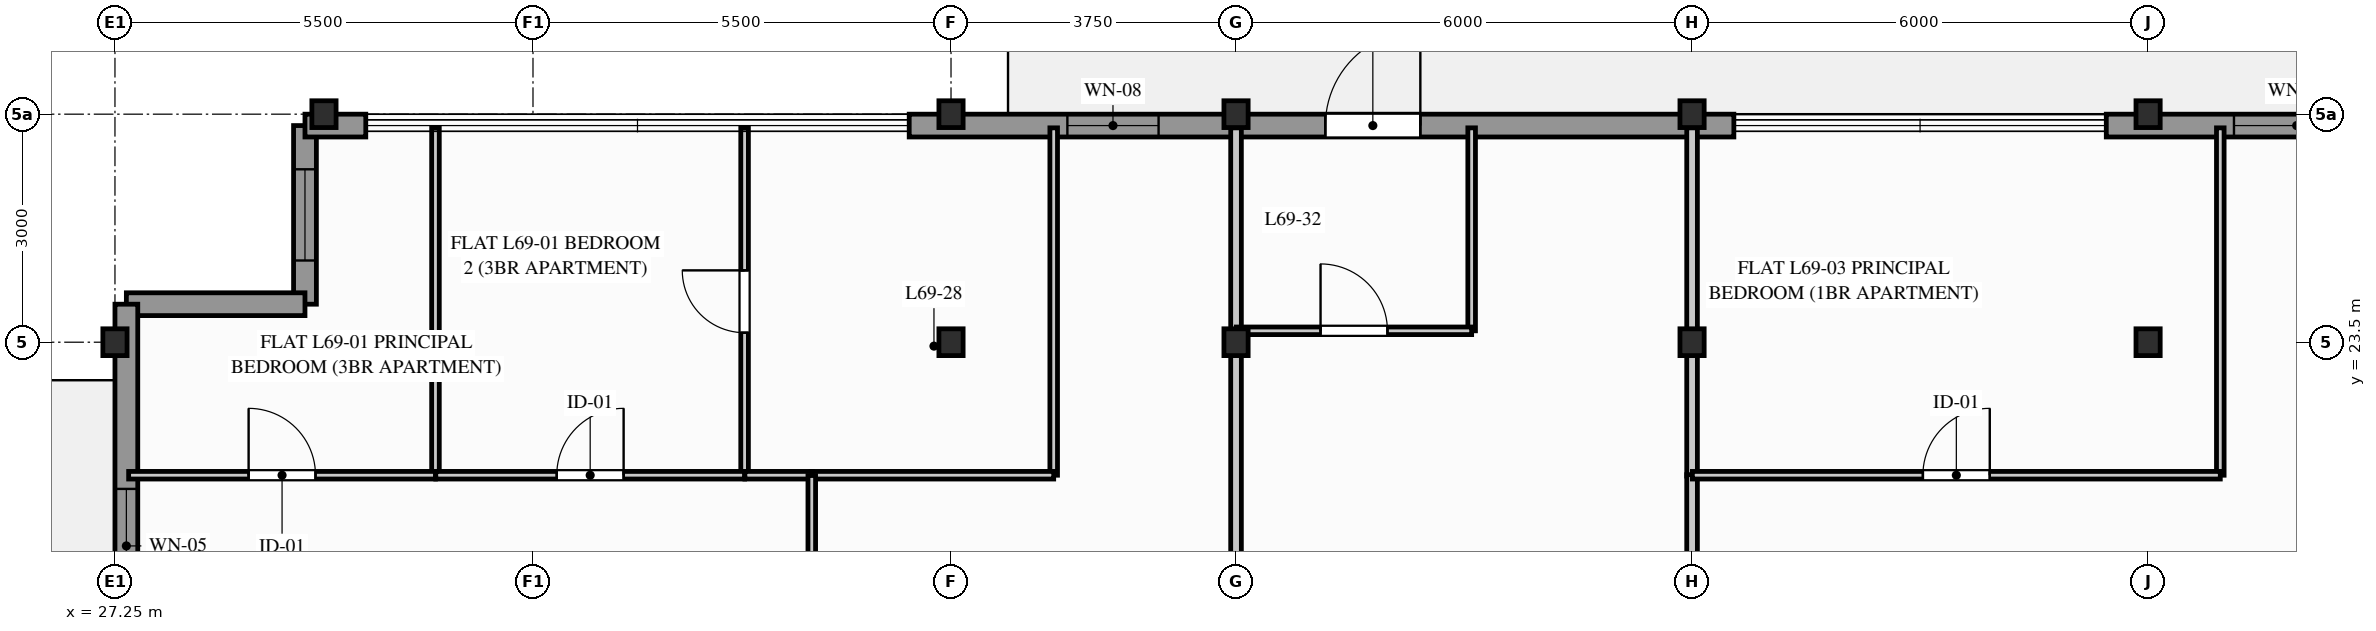
"""IFC4 building model, lengths in metres.
Left out: names, types, materials, properties, quantities, classifications, styles, units other than length and angle.
Written with IfcOpenShell. Run it as: python <this file> out.ifc"""

import sys

from ifc_helpers import new_model, si_unit, direction, frame, frame_2d, origin, origin_2d, place, context, subcontext, project, spatial, rectangle, i_section, extrude, element, fill, save


model = new_model("IFC4")
c1 = context("Model", 3, precision=1e-05, world=origin(), true_north=direction((0.0, 1.0)))
c2 = subcontext(c1, "Body", "Model", "MODEL_VIEW")
j1 = project(units=[si_unit("LENGTHUNIT", "METRE"), si_unit("PLANEANGLEUNIT", "RADIAN")], contexts=[c1])
p1 = place(None, origin())
s1 = spatial("IfcSite", under=j1, at=p1, CompositionType="ELEMENT")
p2 = place(p1, origin())
s2 = spatial("IfcBuilding", under=s1, at=p2, CompositionType="ELEMENT")
p3 = place(p2, frame((0.0, 0.0, 227.3)))
s3 = spatial("IfcBuildingStorey", under=s2, at=p3, CompositionType="ELEMENT", Elevation=227.3)
for number, where, z_axis, x_axis in (
    (1, (27.25, 23.5, 0.0), (0.0, 0.0, 1.0), (1.0, 0.0, 0.0)),
    (2, (30.0, 26.5, 0.0), (0.0, 0.0, 1.0), (1.0, 0.0, 0.0)),
    (3, (38.25, 23.5, 0.0), (0.0, 0.0, 1.0), (1.0, 0.0, 0.0)),
    (4, (38.25, 26.5, 0.0), (0.0, 0.0, 1.0), (1.0, 0.0, 0.0)),
    (5, (42.0, 23.5, 0.0), (0.0, 0.0, 1.0), (1.0, 0.0, 0.0)),
    (6, (42.0, 26.5, 0.0), (0.0, 0.0, 1.0), (1.0, 0.0, 0.0)),
    (7, (48.0, 23.5, 0.0), (0.0, 0.0, 1.0), (1.0, 0.0, 0.0)),
    (8, (48.0, 26.5, 0.0), (0.0, 0.0, 1.0), (1.0, 0.0, 0.0)),
    (9, (54.0, 23.5, 0.0), (0.0, 0.0, 1.0), (1.0, 0.0, 0.0)),
    (10, (54.0, 26.5, 0.0), (0.0, 0.0, 1.0), (1.0, 0.0, 0.0)),
):
    element("IfcColumn", number, at=place(p3, frame(where, z_axis=z_axis, x_axis=x_axis)), inside=s3, PredefinedType="COLUMN", context=c2, shape_type="SweptSolid", body=[
        extrude(i_section(OverallWidth=0.318, OverallDepth=0.353, WebThickness=0.023, FlangeThickness=0.038, FilletRadius=0.015, at=origin_2d()), origin(), (0.0, 0.0, 1.0), 3.1),
    ])
p4 = place(p3, frame((29.75, 26.35, 0.0), z_axis=(0.0, 0.0, 1.0), x_axis=(0.0, -1.0, 0.0)))
e11 = element("IfcWall", 11, at=p4, inside=s3, PredefinedType="STANDARD", context=c2, shape_type="SweptSolid", body=[
    extrude(rectangle(XDim=2.35, YDim=0.3, at=frame_2d((1.175, 0.0))), origin(), (0.0, 0.0, 1.0), 2.89),
])
p5 = place(p4, frame((0.575, 0.0, 0.95)))
e12 = element("IfcOpeningElement", 12, at=p5, cuts=e11, PredefinedType="OPENING", context=c2, shape_type="SweptSolid", body=[
    extrude(rectangle(XDim=1.2, YDim=1.6, at=frame_2d((0.6, 0.8))), frame((0.0, 0.16, 0.0), z_axis=(0.0, -1.0, 0.0), x_axis=(1.0, 0.0, 0.0)), (0.0, 0.0, 1.0), 0.32),
])
p6 = place(p3, frame((29.75, 24.0, 0.0), z_axis=(0.0, 0.0, 1.0), x_axis=(-1.0, 0.0, 0.0)))
e13 = element("IfcWall", 13, at=p6, inside=s3, PredefinedType="STANDARD", context=c2, shape_type="SweptSolid", body=[
    extrude(rectangle(XDim=2.35, YDim=0.3, at=frame_2d((1.175, 0.0))), origin(), (0.0, 0.0, 1.0), 2.89),
])
p7 = place(p3, frame((29.75, 26.35, 0.0), z_axis=(0.0, 0.0, 1.0), x_axis=(1.0, 0.0, 0.0)))
e14 = element("IfcWall", 14, at=p7, inside=s3, PredefinedType="STANDARD", context=c2, shape_type="SweptSolid", body=[
    extrude(rectangle(XDim=0.8, YDim=0.3, at=frame_2d((0.4, 0.0))), origin(), (0.0, 0.0, 1.0), 2.89),
])
p8 = place(p3, frame((37.7, 26.35, 0.0), z_axis=(0.0, 0.0, 1.0), x_axis=(1.0, 0.0, 0.0)))
e15 = element("IfcWall", 15, at=p8, inside=s3, PredefinedType="STANDARD", context=c2, shape_type="SweptSolid", body=[
    extrude(rectangle(XDim=10.85, YDim=0.3, at=frame_2d((5.425, 0.0))), origin(), (0.0, 0.0, 1.0), 2.332),
])
p9 = place(p8, frame((5.475, 0.0, 0.0)))
e16 = element("IfcOpeningElement", 16, at=p9, cuts=e15, PredefinedType="OPENING", context=c2, shape_type="SweptSolid", body=[
    extrude(rectangle(XDim=1.25, YDim=2.2, at=frame_2d((0.625, 1.1))), frame((0.0, 0.16, 0.0), z_axis=(0.0, -1.0, 0.0), x_axis=(1.0, 0.0, 0.0)), (0.0, 0.0, 1.0), 0.32),
])
p10 = place(p8, frame((2.081, 0.0, 0.512)))
e17 = element("IfcOpeningElement", 17, at=p10, cuts=e15, PredefinedType="OPENING", context=c2, shape_type="SweptSolid", body=[
    extrude(rectangle(XDim=1.2, YDim=1.6, at=frame_2d((0.6, 0.8))), frame((0.0, 0.16, 0.0), z_axis=(0.0, -1.0, 0.0), x_axis=(1.0, 0.0, 0.0)), (0.0, 0.0, 1.0), 0.32),
])
p11 = place(p3, frame((53.45, 26.35, 0.0), z_axis=(0.0, 0.0, 1.0), x_axis=(1.0, 0.0, 0.0)))
e18 = element("IfcWall", 18, at=p11, inside=s3, PredefinedType="STANDARD", context=c2, shape_type="SweptSolid", body=[
    extrude(rectangle(XDim=4.05, YDim=0.3, at=frame_2d((2.025, 0.0))), origin(), (0.0, 0.0, 1.0), 2.89),
])
p12 = place(p11, frame((1.68, 0.0, 0.77)))
e19 = element("IfcOpeningElement", 19, at=p12, cuts=e18, PredefinedType="OPENING", context=c2, shape_type="SweptSolid", body=[
    extrude(rectangle(XDim=1.65, YDim=1.9, at=frame_2d((0.825, 0.95))), frame((0.0, 0.16, 0.0), z_axis=(0.0, -1.0, 0.0), x_axis=(1.0, 0.0, 0.0)), (0.0, 0.0, 1.0), 0.32),
])
p13 = place(p3, frame((27.4, 24.0, 0.0), z_axis=(0.0, 0.0, 1.0), x_axis=(0.0, -1.0, 0.0)))
e20 = element("IfcWall", 20, at=p13, inside=s3, PredefinedType="STANDARD", context=c2, shape_type="SweptSolid", body=[
    extrude(rectangle(XDim=21.5, YDim=0.3, at=frame_2d((10.75, 0.0))), origin(), (0.0, 0.0, 1.0), 2.332),
])
p14 = place(p13, frame((5.5, 0.0, 0.0)))
e21 = element("IfcOpeningElement", 21, at=p14, cuts=e20, PredefinedType="OPENING", context=c2, shape_type="SweptSolid", body=[
    extrude(rectangle(XDim=1.1, YDim=2.2, at=frame_2d((0.55, 1.1))), frame((0.0, 0.16, 0.0), z_axis=(0.0, -1.0, 0.0), x_axis=(1.0, 0.0, 0.0)), (0.0, 0.0, 1.0), 0.32),
])
p15 = place(p13, frame((2.43, 0.0, 0.312)))
e22 = element("IfcOpeningElement", 22, at=p15, cuts=e20, PredefinedType="OPENING", context=c2, shape_type="SweptSolid", body=[
    extrude(rectangle(XDim=1.5, YDim=1.8, at=frame_2d((0.75, 0.9))), frame((0.0, 0.16, 0.0), z_axis=(0.0, -1.0, 0.0), x_axis=(1.0, 0.0, 0.0)), (0.0, 0.0, 1.0), 0.32),
])
p16 = place(p3, frame((31.467, 21.75, 0.0), z_axis=(0.0, 0.0, 1.0), x_axis=(0.0, 1.0, 0.0)))
e23 = element("IfcWall", 23, at=p16, inside=s3, PredefinedType="PARTITIONING", context=c2, shape_type="SweptSolid", body=[
    extrude(rectangle(XDim=4.57, YDim=0.1, at=frame_2d((2.285, 0.0))), origin(), (0.0, 0.0, 1.0), 2.325),
])
p17 = place(p3, frame((27.43, 21.75, 0.0), z_axis=(0.0, 0.0, 1.0), x_axis=(1.0, 0.0, 0.0)))
e24 = element("IfcWall", 24, at=p17, inside=s3, PredefinedType="PARTITIONING", context=c2, shape_type="SweptSolid", body=[
    extrude(rectangle(XDim=4.037, YDim=0.1, at=frame_2d((2.019, 0.0))), origin(), (0.0, 0.0, 1.0), 2.89),
])
p18 = place(p17, frame((1.579, 0.0, 0.0)))
e25 = element("IfcOpeningElement", 25, at=p18, cuts=e24, PredefinedType="OPENING", context=c2, shape_type="SweptSolid", body=[
    extrude(rectangle(XDim=0.88, YDim=2.04, at=frame_2d((0.44, 1.02))), frame((0.0, 0.06, 0.0), z_axis=(0.0, -1.0, 0.0), x_axis=(1.0, 0.0, 0.0)), (0.0, 0.0, 1.0), 0.12),
])
p19 = place(p3, frame((35.534, 21.75, 0.0), z_axis=(0.0, 0.0, 1.0), x_axis=(0.0, 1.0, 0.0)))
e26 = element("IfcWall", 26, at=p19, inside=s3, PredefinedType="PARTITIONING", context=c2, shape_type="SweptSolid", body=[
    extrude(rectangle(XDim=4.57, YDim=0.1, at=frame_2d((2.285, 0.0))), origin(), (0.0, 0.0, 1.0), 2.325),
])
p20 = place(p19, frame((1.875, 0.0, 0.0)))
e27 = element("IfcOpeningElement", 27, at=p20, cuts=e26, PredefinedType="OPENING", context=c2, shape_type="SweptSolid", body=[
    extrude(rectangle(XDim=0.82, YDim=2.02, at=frame_2d((0.41, 1.01))), frame((0.0, 0.06, 0.0), z_axis=(0.0, -1.0, 0.0), x_axis=(1.0, 0.0, 0.0)), (0.0, 0.0, 1.0), 0.12),
])
p21 = place(p3, frame((31.471, 21.75, 0.0), z_axis=(0.0, 0.0, 1.0), x_axis=(1.0, 0.0, 0.0)))
e28 = element("IfcWall", 28, at=p21, inside=s3, PredefinedType="PARTITIONING", context=c2, shape_type="SweptSolid", body=[
    extrude(rectangle(XDim=4.063, YDim=0.1, at=frame_2d((2.031, 0.0))), origin(), (0.0, 0.0, 1.0), 2.89),
])
p22 = place(p21, frame((1.592, 0.0, 0.0)))
e29 = element("IfcOpeningElement", 29, at=p22, cuts=e28, PredefinedType="OPENING", context=c2, shape_type="SweptSolid", body=[
    extrude(rectangle(XDim=0.88, YDim=2.04, at=frame_2d((0.44, 1.02))), frame((0.0, 0.06, 0.0), z_axis=(0.0, -1.0, 0.0), x_axis=(1.0, 0.0, 0.0)), (0.0, 0.0, 1.0), 0.12),
])
p23 = place(p3, frame((39.601, 21.75, 0.0), z_axis=(0.0, 0.0, 1.0), x_axis=(0.0, 1.0, 0.0)))
e30 = element("IfcWall", 30, at=p23, inside=s3, PredefinedType="PARTITIONING", context=c2, shape_type="SweptSolid", body=[
    extrude(rectangle(XDim=4.57, YDim=0.1, at=frame_2d((2.285, 0.0))), origin(), (0.0, 0.0, 1.0), 2.325),
])
p24 = place(p3, frame((36.407, 21.75, 0.0), z_axis=(0.0, 0.0, 1.0), x_axis=(1.0, 0.0, 0.0)))
e31 = element("IfcWall", 31, at=p24, inside=s3, PredefinedType="PARTITIONING", context=c2, shape_type="SweptSolid", body=[
    extrude(rectangle(XDim=3.194, YDim=0.1, at=frame_2d((1.597, 0.0))), origin(), (0.0, 0.0, 1.0), 2.325),
])
p25 = place(p3, frame((35.538, 21.75, 0.0), z_axis=(0.0, 0.0, 1.0), x_axis=(1.0, 0.0, 0.0)))
e32 = element("IfcWall", 32, at=p25, inside=s3, PredefinedType="PARTITIONING", context=c2, shape_type="SweptSolid", body=[
    extrude(rectangle(XDim=0.887, YDim=0.1, at=frame_2d((0.444, 0.0))), origin(), (0.0, 0.0, 1.0), 2.89),
])
p26 = place(p3, frame((36.418, 16.85, 0.0), z_axis=(0.0, 0.0, 1.0), x_axis=(0.0, 1.0, 0.0)))
e33 = element("IfcWall", 33, at=p26, inside=s3, PredefinedType="PARTITIONING", context=c2, shape_type="SweptSolid", body=[
    extrude(rectangle(XDim=4.896, YDim=0.1, at=frame_2d((2.448, 0.0))), origin(), (0.0, 0.0, 1.0), 2.614),
])
p27 = place(p26, frame((2.008, 0.0, 0.0)))
e34 = element("IfcOpeningElement", 34, at=p27, cuts=e33, PredefinedType="OPENING", context=c2, shape_type="SweptSolid", body=[
    extrude(rectangle(XDim=0.88, YDim=2.04, at=frame_2d((0.44, 1.02))), frame((0.0, 0.06, 0.0), z_axis=(0.0, -1.0, 0.0), x_axis=(1.0, 0.0, 0.0)), (0.0, 0.0, 1.0), 0.12),
])
p28 = place(p3, frame((42.0, 23.639, 0.0), z_axis=(0.0, 0.0, 1.0), x_axis=(0.0, 1.0, 0.0)))
e35 = element("IfcWall", 35, at=p28, inside=s3, PredefinedType="PARTITIONING", context=c2, shape_type="SweptSolid", body=[
    extrude(rectangle(XDim=2.681, YDim=0.14, at=frame_2d((1.341, 0.0))), origin(), (0.0, 0.0, 1.0), 2.325),
])
p29 = place(p3, frame((42.0, 17.043, 0.0), z_axis=(0.0, 0.0, 1.0), x_axis=(0.0, 1.0, 0.0)))
e36 = element("IfcWall", 36, at=p29, inside=s3, PredefinedType="PARTITIONING", context=c2, shape_type="SweptSolid", body=[
    extrude(rectangle(XDim=6.615, YDim=0.14, at=frame_2d((3.307, 0.0))), origin(), (0.0, 0.0, 1.0), 2.325),
])
p30 = place(p3, frame((45.1, 23.65, 0.0), z_axis=(0.0, 0.0, 1.0), x_axis=(0.0, 1.0, 0.0)))
e37 = element("IfcWall", 37, at=p30, inside=s3, PredefinedType="PARTITIONING", context=c2, shape_type="SweptSolid", body=[
    extrude(rectangle(XDim=2.67, YDim=0.1, at=frame_2d((1.335, 0.0))), origin(), (0.0, 0.0, 1.0), 2.89),
])
p31 = place(p3, frame((42.004, 23.65, 0.0), z_axis=(0.0, 0.0, 1.0), x_axis=(1.0, 0.0, 0.0)))
e38 = element("IfcWall", 38, at=p31, inside=s3, PredefinedType="PARTITIONING", context=c2, shape_type="SweptSolid", body=[
    extrude(rectangle(XDim=3.096, YDim=0.1, at=frame_2d((1.548, 0.0))), origin(), (0.0, 0.0, 1.0), 2.325),
])
p32 = place(p31, frame((1.108, 0.0, 0.0)))
e39 = element("IfcOpeningElement", 39, at=p32, cuts=e38, PredefinedType="OPENING", context=c2, shape_type="SweptSolid", body=[
    extrude(rectangle(XDim=0.88, YDim=2.04, at=frame_2d((0.44, 1.02))), frame((0.0, 0.06, 0.0), z_axis=(0.0, -1.0, 0.0), x_axis=(1.0, 0.0, 0.0)), (0.0, 0.0, 1.0), 0.12),
])
p33 = place(p3, frame((48.0, 21.739, 0.0), z_axis=(0.0, 0.0, 1.0), x_axis=(0.0, 1.0, 0.0)))
e40 = element("IfcWall", 40, at=p33, inside=s3, PredefinedType="PARTITIONING", context=c2, shape_type="SweptSolid", body=[
    extrude(rectangle(XDim=4.581, YDim=0.14, at=frame_2d((2.291, 0.0))), origin(), (0.0, 0.0, 1.0), 2.325),
])
p34 = place(p3, frame((48.0, 14.504, 0.0), z_axis=(0.0, 0.0, 1.0), x_axis=(0.0, 1.0, 0.0)))
e41 = element("IfcWall", 41, at=p34, inside=s3, PredefinedType="PARTITIONING", context=c2, shape_type="SweptSolid", body=[
    extrude(rectangle(XDim=7.253, YDim=0.14, at=frame_2d((3.627, 0.0))), origin(), (0.0, 0.0, 1.0), 2.325),
])
p35 = place(p3, frame((54.95, 21.75, 0.0), z_axis=(0.0, 0.0, 1.0), x_axis=(0.0, 1.0, 0.0)))
e42 = element("IfcWall", 42, at=p35, inside=s3, PredefinedType="PARTITIONING", context=c2, shape_type="SweptSolid", body=[
    extrude(rectangle(XDim=4.57, YDim=0.1, at=frame_2d((2.285, 0.0))), origin(), (0.0, 0.0, 1.0), 2.325),
])
p36 = place(p3, frame((48.004, 21.75, 0.0), z_axis=(0.0, 0.0, 1.0), x_axis=(1.0, 0.0, 0.0)))
e43 = element("IfcWall", 43, at=p36, inside=s3, PredefinedType="PARTITIONING", context=c2, shape_type="SweptSolid", body=[
    extrude(rectangle(XDim=6.946, YDim=0.1, at=frame_2d((3.473, 0.0))), origin(), (0.0, 0.0, 1.0), 2.325),
])
p37 = place(p36, frame((3.033, 0.0, 0.0)))
e44 = element("IfcOpeningElement", 44, at=p37, cuts=e43, PredefinedType="OPENING", context=c2, shape_type="SweptSolid", body=[
    extrude(rectangle(XDim=0.88, YDim=2.04, at=frame_2d((0.44, 1.02))), frame((0.0, 0.06, 0.0), z_axis=(0.0, -1.0, 0.0), x_axis=(1.0, 0.0, 0.0)), (0.0, 0.0, 1.0), 0.12),
])
p38 = place(p9, origin())
e45 = element("IfcDoor", 45, at=p38, inside=s3, OperationType="SINGLE_SWING_RIGHT", PredefinedType="DOOR", context=c2, shape_type="SweptSolid", body=[
    extrude(rectangle(XDim=1.25, YDim=2.2, at=frame_2d((0.625, 1.1))), frame((0.0, 0.025, 0.0), z_axis=(0.0, -1.0, 0.0), x_axis=(1.0, 0.0, 0.0)), (0.0, 0.0, 1.0), 0.05),
])
fill(e16, e45)
p39 = place(p10, origin())
e46 = element("IfcWindow", 46, at=p39, inside=s3, PartitioningType="SINGLE_PANEL", PredefinedType="WINDOW", context=c2, shape_type="SweptSolid", body=[
    extrude(rectangle(XDim=1.2, YDim=1.6, at=frame_2d((0.6, 0.8))), frame((0.0, 0.03, 0.0), z_axis=(0.0, -1.0, 0.0), x_axis=(1.0, 0.0, 0.0)), (0.0, 0.0, 1.0), 0.06),
])
fill(e17, e46)
p40 = place(p12, origin())
e47 = element("IfcWindow", 47, at=p40, inside=s3, PartitioningType="SINGLE_PANEL", PredefinedType="WINDOW", context=c2, shape_type="SweptSolid", body=[
    extrude(rectangle(XDim=1.65, YDim=1.9, at=frame_2d((0.825, 0.95))), frame((0.0, 0.03, 0.0), z_axis=(0.0, -1.0, 0.0), x_axis=(1.0, 0.0, 0.0)), (0.0, 0.0, 1.0), 0.06),
])
fill(e19, e47)
p41 = place(p15, origin())
e48 = element("IfcWindow", 48, at=p41, inside=s3, PartitioningType="SINGLE_PANEL", PredefinedType="WINDOW", context=c2, shape_type="SweptSolid", body=[
    extrude(rectangle(XDim=1.5, YDim=1.8, at=frame_2d((0.75, 0.9))), frame((0.0, 0.03, 0.0), z_axis=(0.0, -1.0, 0.0), x_axis=(1.0, 0.0, 0.0)), (0.0, 0.0, 1.0), 0.06),
])
fill(e22, e48)
p42 = place(p18, origin())
e49 = element("IfcDoor", 49, at=p42, inside=s3, OperationType="SINGLE_SWING_LEFT", PredefinedType="DOOR", context=c2, shape_type="SweptSolid", body=[
    extrude(rectangle(XDim=0.88, YDim=2.04, at=frame_2d((0.44, 1.02))), frame((0.0, 0.025, 0.0), z_axis=(0.0, -1.0, 0.0), x_axis=(1.0, 0.0, 0.0)), (0.0, 0.0, 1.0), 0.05),
])
fill(e25, e49)
p43 = place(p22, origin())
e50 = element("IfcDoor", 50, at=p43, inside=s3, OperationType="SINGLE_SWING_RIGHT", PredefinedType="DOOR", context=c2, shape_type="SweptSolid", body=[
    extrude(rectangle(XDim=0.88, YDim=2.04, at=frame_2d((0.44, 1.02))), frame((0.0, 0.025, 0.0), z_axis=(0.0, -1.0, 0.0), x_axis=(1.0, 0.0, 0.0)), (0.0, 0.0, 1.0), 0.05),
])
fill(e29, e50)
p44 = place(p32, origin())
e51 = element("IfcDoor", 51, at=p44, inside=s3, OperationType="SINGLE_SWING_LEFT", PredefinedType="DOOR", context=c2, shape_type="SweptSolid", body=[
    extrude(rectangle(XDim=0.88, YDim=2.04, at=frame_2d((0.44, 1.02))), frame((0.0, 0.025, 0.0), z_axis=(0.0, -1.0, 0.0), x_axis=(1.0, 0.0, 0.0)), (0.0, 0.0, 1.0), 0.05),
])
fill(e39, e51)
p45 = place(p37, origin())
e52 = element("IfcDoor", 52, at=p45, inside=s3, OperationType="SINGLE_SWING_RIGHT", PredefinedType="DOOR", context=c2, shape_type="SweptSolid", body=[
    extrude(rectangle(XDim=0.88, YDim=2.04, at=frame_2d((0.44, 1.02))), frame((0.0, 0.025, 0.0), z_axis=(0.0, -1.0, 0.0), x_axis=(1.0, 0.0, 0.0)), (0.0, 0.0, 1.0), 0.05),
])
fill(e44, e52)
p46 = place(p20, origin())
e53 = element("IfcDoor", 53, at=p46, inside=s3, OperationType="SINGLE_SWING_RIGHT", PredefinedType="DOOR", context=c2, shape_type="SweptSolid", body=[
    extrude(rectangle(XDim=0.82, YDim=2.02, at=frame_2d((0.41, 1.01))), frame((0.0, 0.025, 0.0), z_axis=(0.0, -1.0, 0.0), x_axis=(1.0, 0.0, 0.0)), (0.0, 0.0, 1.0), 0.05),
])
fill(e27, e53)
p47 = place(p5, origin())
e54 = element("IfcWindow", 54, at=p47, inside=s3, PartitioningType="SINGLE_PANEL", PredefinedType="WINDOW", context=c2, shape_type="SweptSolid", body=[
    extrude(rectangle(XDim=1.2, YDim=1.6, at=frame_2d((0.6, 0.8))), frame((0.0, 0.03, 0.0), z_axis=(0.0, -1.0, 0.0), x_axis=(1.0, 0.0, 0.0)), (0.0, 0.0, 1.0), 0.06),
])
fill(e12, e54)
save(model, sys.argv[1])
